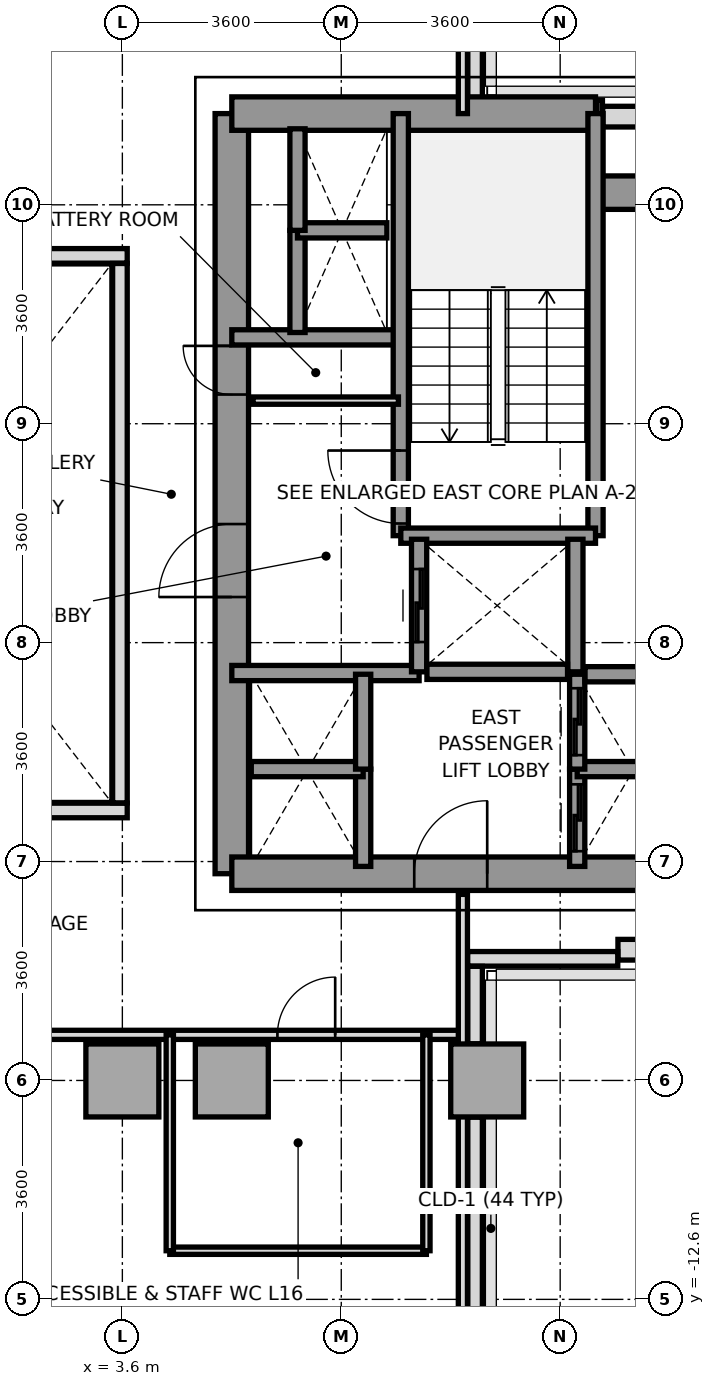
"""IFC4 building model, lengths in metres.
Left out: names, types, materials, properties, quantities, classifications, styles, units other than length and angle.
Written with IfcOpenShell. Run it as: python <this file> out.ifc"""

import sys

from ifc_helpers import new_model, si_unit, direction, frame, frame_2d, origin, origin_2d, place, context, subcontext, project, spatial, rectangle, extrude, source, transform, mapped, element, fill, save


model = new_model("IFC4")
c1 = context("Model", 3, precision=1e-05, world=origin(), true_north=direction((0.0, 1.0)))
c2 = subcontext(c1, "Body", "Model", "MODEL_VIEW")
j1 = project(units=[si_unit("LENGTHUNIT", "METRE"), si_unit("PLANEANGLEUNIT", "RADIAN")], contexts=[c1])
p1 = place(None, origin())
s1 = spatial("IfcSite", under=j1, at=p1, CompositionType="ELEMENT")
p2 = place(p1, origin())
s2 = spatial("IfcBuilding", under=s1, at=p2, CompositionType="ELEMENT")
p3 = place(p2, frame((0.0, 0.0, 64.6)))
s3 = spatial("IfcBuildingStorey", under=s2, at=p3, CompositionType="ELEMENT", Elevation=64.6)
m1 = source(origin(), c2, "Body", "SweptSolid", [
    extrude(rectangle(XDim=1.2, YDim=1.2, at=origin_2d()), origin(), (0.0, 0.0, 1.0), 3.2),
])
for number, where, z_axis, x_axis in (
    (1, (3.6, -9.0, 0.0), (0.0, 0.0, 1.0), (1.0, 0.0, 0.0)),
    (2, (5.4, -9.0, 0.0), (0.0, 0.0, 1.0), (1.0, 0.0, 0.0)),
    (3, (9.6, -9.0, 0.0), (0.0, 0.0, 1.0), (1.0, 0.0, 0.0)),
):
    element("IfcColumn", number, at=place(p3, frame(where, z_axis=z_axis, x_axis=x_axis)), inside=s3, PredefinedType="COLUMN", context=c2, shape_type="MappedRepresentation", body=[
        mapped(m1, transform((0.0, 0.0, 0.0), x_axis=(1.0, 0.0, 0.0), y_axis=(0.0, 1.0, 0.0), z_axis=(0.0, 0.0, 1.0), scale=1.0)),
    ])
p4 = place(p3, frame((11.498, 6.85, 0.0), z_axis=(0.0, 0.0, 1.0), x_axis=(1.0, 0.0, 0.0)))
e4 = element("IfcWall", 4, at=p4, inside=s3, PredefinedType="SOLIDWALL", context=c2, shape_type="SweptSolid", body=[
    extrude(rectangle(XDim=2.535, YDim=0.34, at=frame_2d((1.268, 0.0))), origin(), (0.0, 0.0, 1.0), 3.2),
])
p5 = place(p3, frame((11.75, -6.85, 0.0), z_axis=(0.0, 0.0, 1.0), x_axis=(1.0, 0.0, 0.0)))
e5 = element("IfcWall", 5, at=p5, inside=s3, PredefinedType="SOLIDWALL", context=c2, shape_type="SweptSolid", body=[
    extrude(rectangle(XDim=2.283, YDim=0.34, at=frame_2d((1.142, 0.0))), origin(), (0.0, 0.0, 1.0), 3.2),
])
p6 = place(p3, frame((11.747, -7.0, 0.0), z_axis=(0.0, 0.0, 1.0), x_axis=(-1.0, 0.0, 0.0)))
e6 = element("IfcWall", 6, at=p6, inside=s3, PredefinedType="PARAPET", context=c2, shape_type="SweptSolid", body=[
    extrude(rectangle(XDim=2.469, YDim=0.24, at=frame_2d((1.234, 0.0))), origin(), (0.0, 0.0, 1.0), 1.15),
])
p7 = place(p3, frame((9.4, -7.123, 0.0), z_axis=(0.0, 0.0, 1.0), x_axis=(0.0, -1.0, 0.0)))
e7 = element("IfcWall", 7, at=p7, inside=s3, PredefinedType="PARAPET", context=c2, shape_type="SweptSolid", body=[
    extrude(rectangle(XDim=1.274, YDim=0.24, at=frame_2d((0.637, 0.0))), origin(), (0.0, 0.0, 1.0), 1.15),
])
p8 = place(p3, frame((9.4, -9.603, 0.0), z_axis=(0.0, 0.0, 1.0), x_axis=(0.0, -1.0, 0.0)))
e8 = element("IfcWall", 8, at=p8, inside=s3, PredefinedType="PARAPET", context=c2, shape_type="SweptSolid", body=[
    extrude(rectangle(XDim=6.0, YDim=0.24, at=frame_2d((3.0, 0.0))), origin(), (0.0, 0.0, 1.0), 1.15),
])
p9 = place(p3, frame((9.4, 8.397, 0.0), z_axis=(0.0, 0.0, 1.0), x_axis=(0.0, -1.0, 0.0)))
e9 = element("IfcWall", 9, at=p9, inside=s3, PredefinedType="PARAPET", context=c2, shape_type="SweptSolid", body=[
    extrude(rectangle(XDim=1.444, YDim=0.24, at=frame_2d((0.722, 0.0))), origin(), (0.0, 0.0, 1.0), 1.15),
])
p10 = place(p3, frame((11.403, 7.0, 0.0), z_axis=(0.0, 0.0, 1.0), x_axis=(1.0, 0.0, 0.0)))
e10 = element("IfcWall", 10, at=p10, inside=s3, PredefinedType="PARAPET", context=c2, shape_type="SweptSolid", body=[
    extrude(rectangle(XDim=0.092, YDim=0.24, at=frame_2d((0.046, 0.0))), origin(), (0.0, 0.0, 1.0), 1.15),
])
p11 = place(p3, frame((5.4, -5.6, 0.0), z_axis=(0.0, 0.0, 1.0), x_axis=(0.0, 1.0, 0.0)))
e11 = element("IfcWall", 11, at=p11, inside=s3, PredefinedType="SHEAR", context=c2, shape_type="SweptSolid", body=[
    extrude(rectangle(XDim=12.5, YDim=0.55, at=frame_2d((6.25, 0.0))), origin(), (0.0, 0.0, 1.0), 3.2),
])
p12 = place(p11, frame((4.55, 0.0, 0.0)))
e12 = element("IfcOpeningElement", 12, at=p12, cuts=e11, PredefinedType="OPENING", context=c2, shape_type="SweptSolid", body=[
    extrude(rectangle(XDim=1.2, YDim=2.2, at=frame_2d((0.6, 1.1))), frame((0.0, 0.285, 0.0), z_axis=(0.0, -1.0, 0.0), x_axis=(1.0, 0.0, 0.0)), (0.0, 0.0, 1.0), 0.57),
])
p13 = place(p11, frame((7.88, 0.0, 0.0)))
e13 = element("IfcOpeningElement", 13, at=p13, cuts=e11, PredefinedType="OPENING", context=c2, shape_type="SweptSolid", body=[
    extrude(rectangle(XDim=0.8, YDim=2.1, at=frame_2d((0.4, 1.05))), frame((0.0, 0.285, 0.0), z_axis=(0.0, -1.0, 0.0), x_axis=(1.0, 0.0, 0.0)), (0.0, 0.0, 1.0), 0.57),
])
p14 = place(p3, frame((5.4, 6.9, 0.0), z_axis=(0.0, 0.0, 1.0), x_axis=(1.0, 0.0, 0.0)))
e14 = element("IfcWall", 14, at=p14, inside=s3, PredefinedType="SHEAR", context=c2, shape_type="SweptSolid", body=[
    extrude(rectangle(XDim=5.981, YDim=0.55, at=frame_2d((2.991, 0.0))), origin(), (0.0, 0.0, 1.0), 3.2),
])
p15 = place(p3, frame((11.381, 5.6, 0.0), z_axis=(0.0, 0.0, 1.0), x_axis=(1.0, 0.0, 0.0)))
e15 = element("IfcWall", 15, at=p15, inside=s3, PredefinedType="SHEAR", context=c2, shape_type="SweptSolid", body=[
    extrude(rectangle(XDim=1.819, YDim=0.55, at=frame_2d((0.909, 0.0))), origin(), (0.0, 0.0, 1.0), 3.2),
])
p16 = place(p3, frame((5.4, -5.6, 0.0), z_axis=(0.0, 0.0, 1.0), x_axis=(1.0, 0.0, 0.0)))
e16 = element("IfcWall", 16, at=p16, inside=s3, PredefinedType="SHEAR", context=c2, shape_type="SweptSolid", body=[
    extrude(rectangle(XDim=7.8, YDim=0.55, at=frame_2d((3.9, 0.0))), origin(), (0.0, 0.0, 1.0), 3.2),
])
p17 = place(p16, frame((3.0, 0.0, 0.0)))
e17 = element("IfcOpeningElement", 17, at=p17, cuts=e16, PredefinedType="OPENING", context=c2, shape_type="SweptSolid", body=[
    extrude(rectangle(XDim=1.2, YDim=2.2, at=frame_2d((0.6, 1.1))), frame((0.0, 0.285, 0.0), z_axis=(0.0, -1.0, 0.0), x_axis=(1.0, 0.0, 0.0)), (0.0, 0.0, 1.0), 0.57),
])
p18 = place(p3, frame((5.4, 3.22, 0.0), z_axis=(0.0, 0.0, 1.0), x_axis=(1.0, 0.0, 0.0)))
e18 = element("IfcWall", 18, at=p18, inside=s3, PredefinedType="SOLIDWALL", context=c2, shape_type="SweptSolid", body=[
    extrude(rectangle(XDim=2.78, YDim=0.25, at=frame_2d((1.39, 0.0))), origin(), (0.0, 0.0, 1.0), 3.2),
])
p19 = place(p3, frame((5.4, -2.3, 0.0), z_axis=(0.0, 0.0, 1.0), x_axis=(1.0, 0.0, 0.0)))
e19 = element("IfcWall", 19, at=p19, inside=s3, PredefinedType="SOLIDWALL", context=c2, shape_type="SweptSolid", body=[
    extrude(rectangle(XDim=3.08, YDim=0.25, at=frame_2d((1.54, 0.0))), origin(), (0.0, 0.0, 1.0), 3.2),
])
p20 = place(p3, frame((8.179, -0.041, 0.0), z_axis=(0.0, 0.0, 1.0), x_axis=(0.0, 1.0, 0.0)))
e20 = element("IfcWall", 20, at=p20, inside=s3, PredefinedType="SOLIDWALL", context=c2, shape_type="SweptSolid", body=[
    extrude(rectangle(XDim=6.941, YDim=0.25, at=frame_2d((3.47, 0.0))), origin(), (0.0, 0.0, 1.0), 3.2),
])
p21 = place(p20, frame((0.2, 0.0, 0.0)))
e21 = element("IfcOpeningElement", 21, at=p21, cuts=e20, PredefinedType="OPENING", context=c2, shape_type="SweptSolid", body=[
    extrude(rectangle(XDim=1.2, YDim=2.2, at=frame_2d((0.6, 1.1))), frame((0.0, 0.135, 0.0), z_axis=(0.0, -1.0, 0.0), x_axis=(1.0, 0.0, 0.0)), (0.0, 0.0, 1.0), 0.27),
])
p22 = place(p3, frame((11.381, -0.041, 0.0), z_axis=(0.0, 0.0, 1.0), x_axis=(0.0, 1.0, 0.0)))
e22 = element("IfcWall", 22, at=p22, inside=s3, PredefinedType="SOLIDWALL", context=c2, shape_type="SweptSolid", body=[
    extrude(rectangle(XDim=6.941, YDim=0.25, at=frame_2d((3.47, 0.0))), origin(), (0.0, 0.0, 1.0), 3.2),
])
p23 = place(p3, frame((8.179, -0.041, 0.0), z_axis=(0.0, 0.0, 1.0), x_axis=(1.0, 0.0, 0.0)))
e23 = element("IfcWall", 23, at=p23, inside=s3, PredefinedType="SOLIDWALL", context=c2, shape_type="SweptSolid", body=[
    extrude(rectangle(XDim=3.202, YDim=0.25, at=frame_2d((1.601, 0.0))), origin(), (0.0, 0.0, 1.0), 3.2),
])
p24 = place(p3, frame((8.48, -2.28, 0.0), z_axis=(0.0, 0.0, 1.0), x_axis=(0.0, 1.0, 0.0)))
e24 = element("IfcWall", 24, at=p24, inside=s3, PredefinedType="SOLIDWALL", context=c2, shape_type="SweptSolid", body=[
    extrude(rectangle(XDim=2.18, YDim=0.25, at=frame_2d((1.09, 0.0))), origin(), (0.0, 0.0, 1.0), 3.2),
])
p25 = place(p24, frame((0.49, 0.0, 0.0)))
e25 = element("IfcOpeningElement", 25, at=p25, cuts=e24, PredefinedType="OPENING", context=c2, shape_type="SweptSolid", body=[
    extrude(rectangle(XDim=1.2, YDim=2.2, at=frame_2d((0.6, 1.1))), frame((0.0, 0.135, 0.0), z_axis=(0.0, -1.0, 0.0), x_axis=(1.0, 0.0, 0.0)), (0.0, 0.0, 1.0), 0.27),
])
p26 = place(p3, frame((11.05, -2.28, 0.0), z_axis=(0.0, 0.0, 1.0), x_axis=(0.0, 1.0, 0.0)))
e26 = element("IfcWall", 26, at=p26, inside=s3, PredefinedType="SOLIDWALL", context=c2, shape_type="SweptSolid", body=[
    extrude(rectangle(XDim=2.18, YDim=0.25, at=frame_2d((1.09, 0.0))), origin(), (0.0, 0.0, 1.0), 3.2),
])
p27 = place(p3, frame((8.609, -2.28, 0.0), z_axis=(0.0, 0.0, 1.0), x_axis=(1.0, 0.0, 0.0)))
e27 = element("IfcWall", 27, at=p27, inside=s3, PredefinedType="SOLIDWALL", context=c2, shape_type="SweptSolid", body=[
    extrude(rectangle(XDim=2.312, YDim=0.25, at=frame_2d((1.156, 0.0))), origin(), (0.0, 0.0, 1.0), 3.2),
])
p28 = place(p3, frame((11.08, -5.48, 0.0), z_axis=(0.0, 0.0, 1.0), x_axis=(0.0, 1.0, 0.0)))
e28 = element("IfcWall", 28, at=p28, inside=s3, PredefinedType="SOLIDWALL", context=c2, shape_type="SweptSolid", body=[
    extrude(rectangle(XDim=1.6, YDim=0.25, at=frame_2d((0.8, 0.0))), origin(), (0.0, 0.0, 1.0), 3.2),
])
p29 = place(p28, frame((0.25, 0.0, 0.0)))
e29 = element("IfcOpeningElement", 29, at=p29, cuts=e28, PredefinedType="OPENING", context=c2, shape_type="SweptSolid", body=[
    extrude(rectangle(XDim=1.1, YDim=2.2, at=frame_2d((0.55, 1.1))), frame((0.0, 0.135, 0.0), z_axis=(0.0, -1.0, 0.0), x_axis=(1.0, 0.0, 0.0)), (0.0, 0.0, 1.0), 0.27),
])
p30 = place(p3, frame((11.08, -3.88, 0.0), z_axis=(0.0, 0.0, 1.0), x_axis=(1.0, 0.0, 0.0)))
e30 = element("IfcWall", 30, at=p30, inside=s3, PredefinedType="SOLIDWALL", context=c2, shape_type="SweptSolid", body=[
    extrude(rectangle(XDim=1.84, YDim=0.25, at=frame_2d((0.92, 0.0))), origin(), (0.0, 0.0, 1.0), 3.2),
])
p31 = place(p3, frame((11.08, -3.88, 0.0), z_axis=(0.0, 0.0, 1.0), x_axis=(0.0, 1.0, 0.0)))
e31 = element("IfcWall", 31, at=p31, inside=s3, PredefinedType="SOLIDWALL", context=c2, shape_type="SweptSolid", body=[
    extrude(rectangle(XDim=1.56, YDim=0.25, at=frame_2d((0.78, 0.0))), origin(), (0.0, 0.0, 1.0), 3.2),
])
p32 = place(p31, frame((0.23, 0.0, 0.0)))
e32 = element("IfcOpeningElement", 32, at=p32, cuts=e31, PredefinedType="OPENING", context=c2, shape_type="SweptSolid", body=[
    extrude(rectangle(XDim=1.1, YDim=2.2, at=frame_2d((0.55, 1.1))), frame((0.0, 0.135, 0.0), z_axis=(0.0, -1.0, 0.0), x_axis=(1.0, 0.0, 0.0)), (0.0, 0.0, 1.0), 0.27),
])
p33 = place(p3, frame((11.209, -2.32, 0.0), z_axis=(0.0, 0.0, 1.0), x_axis=(1.0, 0.0, 0.0)))
e33 = element("IfcWall", 33, at=p33, inside=s3, PredefinedType="SOLIDWALL", context=c2, shape_type="SweptSolid", body=[
    extrude(rectangle(XDim=1.582, YDim=0.25, at=frame_2d((0.791, 0.0))), origin(), (0.0, 0.0, 1.0), 3.2),
])
p34 = place(p3, frame((7.56, -5.48, 0.0), z_axis=(0.0, 0.0, 1.0), x_axis=(0.0, 1.0, 0.0)))
e34 = element("IfcWall", 34, at=p34, inside=s3, PredefinedType="SOLIDWALL", context=c2, shape_type="SweptSolid", body=[
    extrude(rectangle(XDim=1.6, YDim=0.25, at=frame_2d((0.8, 0.0))), origin(), (0.0, 0.0, 1.0), 3.2),
])
p35 = place(p3, frame((5.72, -3.88, 0.0), z_axis=(0.0, 0.0, 1.0), x_axis=(1.0, 0.0, 0.0)))
e35 = element("IfcWall", 35, at=p35, inside=s3, PredefinedType="SOLIDWALL", context=c2, shape_type="SweptSolid", body=[
    extrude(rectangle(XDim=1.84, YDim=0.25, at=frame_2d((0.92, 0.0))), origin(), (0.0, 0.0, 1.0), 3.2),
])
p36 = place(p3, frame((7.56, -3.88, 0.0), z_axis=(0.0, 0.0, 1.0), x_axis=(0.0, 1.0, 0.0)))
e36 = element("IfcWall", 36, at=p36, inside=s3, PredefinedType="SOLIDWALL", context=c2, shape_type="SweptSolid", body=[
    extrude(rectangle(XDim=1.56, YDim=0.25, at=frame_2d((0.78, 0.0))), origin(), (0.0, 0.0, 1.0), 3.2),
])
p37 = place(p3, frame((6.48, 3.3, 0.0), z_axis=(0.0, 0.0, 1.0), x_axis=(0.0, 1.0, 0.0)))
e37 = element("IfcWall", 37, at=p37, inside=s3, PredefinedType="SOLIDWALL", context=c2, shape_type="SweptSolid", body=[
    extrude(rectangle(XDim=1.68, YDim=0.25, at=frame_2d((0.84, 0.0))), origin(), (0.0, 0.0, 1.0), 3.2),
])
p38 = place(p3, frame((6.48, 4.98, 0.0), z_axis=(0.0, 0.0, 1.0), x_axis=(1.0, 0.0, 0.0)))
e38 = element("IfcWall", 38, at=p38, inside=s3, PredefinedType="SOLIDWALL", context=c2, shape_type="SweptSolid", body=[
    extrude(rectangle(XDim=1.47, YDim=0.25, at=frame_2d((0.735, 0.0))), origin(), (0.0, 0.0, 1.0), 3.2),
])
p39 = place(p3, frame((6.48, 4.98, 0.0), z_axis=(0.0, 0.0, 1.0), x_axis=(0.0, 1.0, 0.0)))
e39 = element("IfcWall", 39, at=p39, inside=s3, PredefinedType="SOLIDWALL", context=c2, shape_type="SweptSolid", body=[
    extrude(rectangle(XDim=1.67, YDim=0.25, at=frame_2d((0.835, 0.0))), origin(), (0.0, 0.0, 1.0), 3.2),
])
p40 = place(p3, frame((5.75, 2.18, 0.0), z_axis=(0.0, 0.0, 1.0), x_axis=(1.0, 0.0, 0.0)))
e40 = element("IfcWall", 40, at=p40, inside=s3, PredefinedType="PARTITIONING", context=c2, shape_type="SweptSolid", body=[
    extrude(rectangle(XDim=2.39, YDim=0.12, at=frame_2d((1.195, 0.0))), origin(), (0.0, 0.0, 1.0), 2.3),
])
p41 = place(p3, frame((9.2, 6.9, 0.0), z_axis=(0.0, 0.0, 1.0), x_axis=(0.0, 1.0, 0.0)))
e41 = element("IfcWall", 41, at=p41, inside=s3, PredefinedType="PARTITIONING", context=c2, shape_type="SweptSolid", body=[
    extrude(rectangle(XDim=8.78, YDim=0.15, at=frame_2d((4.39, 0.0))), origin(), (0.0, 0.0, 1.0), 2.65),
])
p42 = place(p3, frame((-9.2, -8.25, 0.0), z_axis=(0.0, 0.0, 1.0), x_axis=(1.0, 0.0, 0.0)))
e42 = element("IfcWall", 42, at=p42, inside=s3, PredefinedType="PARTITIONING", context=c2, shape_type="SweptSolid", body=[
    extrude(rectangle(XDim=18.4, YDim=0.15, at=frame_2d((9.2, 0.0))), origin(), (0.0, 0.0, 1.0), 2.7),
])
p43 = place(p42, frame((15.35, 0.0, 0.0)))
e43 = element("IfcOpeningElement", 43, at=p43, cuts=e42, PredefinedType="OPENING", context=c2, shape_type="SweptSolid", body=[
    extrude(rectangle(XDim=0.95, YDim=2.15, at=frame_2d((0.475, 1.075))), frame((0.0, 0.085, 0.0), z_axis=(0.0, -1.0, 0.0), x_axis=(1.0, 0.0, 0.0)), (0.0, 0.0, 1.0), 0.17),
])
p44 = place(p42, frame((6.7, 0.0, 0.0)))
e44 = element("IfcOpeningElement", 44, at=p44, cuts=e42, PredefinedType="OPENING", context=c2, shape_type="SweptSolid", body=[
    extrude(rectangle(XDim=1.1, YDim=2.2, at=frame_2d((0.55, 1.1))), frame((0.0, 0.085, 0.0), z_axis=(0.0, -1.0, 0.0), x_axis=(1.0, 0.0, 0.0)), (0.0, 0.0, 1.0), 0.17),
])
p45 = place(p3, frame((9.2, -15.68, 0.0), z_axis=(0.0, 0.0, 1.0), x_axis=(0.0, 1.0, 0.0)))
e45 = element("IfcWall", 45, at=p45, inside=s3, PredefinedType="PARTITIONING", context=c2, shape_type="SweptSolid", body=[
    extrude(rectangle(XDim=9.74, YDim=0.15, at=frame_2d((4.87, 0.0))), origin(), (0.0, 0.0, 1.0), 2.65),
])
p46 = place(p3, frame((4.38, -11.8, 0.0), z_axis=(0.0, 0.0, 1.0), x_axis=(1.0, 0.0, 0.0)))
e46 = element("IfcWall", 46, at=p46, inside=s3, PredefinedType="PARTITIONING", context=c2, shape_type="SweptSolid", body=[
    extrude(rectangle(XDim=4.22, YDim=0.12, at=frame_2d((2.11, 0.0))), origin(), (0.0, 0.0, 1.0), 3.2),
])
p47 = place(p3, frame((4.38, -11.8, 0.0), z_axis=(0.0, 0.0, 1.0), x_axis=(0.0, 1.0, 0.0)))
e47 = element("IfcWall", 47, at=p47, inside=s3, PredefinedType="PARTITIONING", context=c2, shape_type="SweptSolid", body=[
    extrude(rectangle(XDim=3.55, YDim=0.12, at=frame_2d((1.775, 0.0))), origin(), (0.0, 0.0, 1.0), 3.2),
])
p48 = place(p3, frame((8.6, -11.8, 0.0), z_axis=(0.0, 0.0, 1.0), x_axis=(0.0, 1.0, 0.0)))
e48 = element("IfcWall", 48, at=p48, inside=s3, PredefinedType="PARTITIONING", context=c2, shape_type="SweptSolid", body=[
    extrude(rectangle(XDim=3.55, YDim=0.12, at=frame_2d((1.775, 0.0))), origin(), (0.0, 0.0, 1.0), 2.65),
])
for number, where, z_axis, x_axis in (
    (49, (-3.68, -4.56, 0.0), (0.0, 0.0, 1.0), (1.0, 0.0, 0.0)),
    (50, (-3.68, 4.56, 0.0), (0.0, 0.0, 1.0), (1.0, 0.0, 0.0)),
):
    element("IfcWall", number, at=place(p3, frame(where, z_axis=z_axis, x_axis=x_axis)), inside=s3, PredefinedType="PARAPET", context=c2, shape_type="SweptSolid", body=[
        extrude(rectangle(XDim=7.36, YDim=0.24, at=frame_2d((3.68, 0.0))), origin(), (0.0, 0.0, 1.0), 1.15),
    ])
p49 = place(p3, frame((3.56, -4.435, 0.0), z_axis=(0.0, 0.0, 1.0), x_axis=(0.0, 1.0, 0.0)))
e51 = element("IfcWall", 51, at=p49, inside=s3, PredefinedType="PARAPET", context=c2, shape_type="SweptSolid", body=[
    extrude(rectangle(XDim=8.87, YDim=0.24, at=frame_2d((4.435, 0.0))), origin(), (0.0, 0.0, 1.0), 1.15),
])
m2 = source(origin(), c2, "Body", "SweptSolid", [
    extrude(rectangle(XDim=1.2, YDim=2.2, at=frame_2d((0.6, 1.1))), frame((0.0, 0.025, 0.0), z_axis=(0.0, -1.0, 0.0), x_axis=(1.0, 0.0, 0.0)), (0.0, 0.0, 1.0), 0.05),
])
p50 = place(p21, origin())
e52 = element("IfcDoor", 52, at=p50, inside=s3, OperationType="SINGLE_SWING_RIGHT", PredefinedType="DOOR", context=c2, shape_type="MappedRepresentation", body=[
    mapped(m2, transform((0.0, 0.0, 0.0), x_axis=(1.0, 0.0, 0.0), y_axis=(0.0, 1.0, 0.0), z_axis=(0.0, 0.0, 1.0), scale=1.0)),
])
fill(e21, e52)
p51 = place(p12, origin())
e53 = element("IfcDoor", 53, at=p51, inside=s3, OperationType="SINGLE_SWING_LEFT", PredefinedType="DOOR", context=c2, shape_type="MappedRepresentation", body=[
    mapped(m2, transform((0.0, 0.0, 0.0), x_axis=(1.0, 0.0, 0.0), y_axis=(0.0, 1.0, 0.0), z_axis=(0.0, 0.0, 1.0), scale=1.0)),
])
fill(e12, e53)
p52 = place(p17, origin())
e54 = element("IfcDoor", 54, at=p52, inside=s3, OperationType="SINGLE_SWING_RIGHT", PredefinedType="DOOR", context=c2, shape_type="MappedRepresentation", body=[
    mapped(m2, transform((0.0, 0.0, 0.0), x_axis=(1.0, 0.0, 0.0), y_axis=(0.0, 1.0, 0.0), z_axis=(0.0, 0.0, 1.0), scale=1.0)),
])
fill(e17, e54)
m3 = source(origin(), c2, "Body", "SweptSolid", [
    extrude(rectangle(XDim=0.8, YDim=2.1, at=frame_2d((0.4, 1.05))), frame((0.0, 0.025, 0.0), z_axis=(0.0, -1.0, 0.0), x_axis=(1.0, 0.0, 0.0)), (0.0, 0.0, 1.0), 0.05),
])
p53 = place(p13, origin())
e55 = element("IfcDoor", 55, at=p53, inside=s3, OperationType="SINGLE_SWING_RIGHT", PredefinedType="DOOR", context=c2, shape_type="MappedRepresentation", body=[
    mapped(m3, transform((0.0, 0.0, 0.0), x_axis=(1.0, 0.0, 0.0), y_axis=(0.0, 1.0, 0.0), z_axis=(0.0, 0.0, 1.0), scale=1.0)),
])
fill(e13, e55)
p54 = place(p25, origin())
e56 = element("IfcDoor", 56, at=p54, inside=s3, OperationType="SLIDING_TO_RIGHT", PredefinedType="DOOR", context=c2, shape_type="MappedRepresentation", body=[
    mapped(m2, transform((0.0, 0.0, 0.0), x_axis=(1.0, 0.0, 0.0), y_axis=(0.0, 1.0, 0.0), z_axis=(0.0, 0.0, 1.0), scale=1.0)),
])
fill(e25, e56)
m4 = source(origin(), c2, "Body", "SweptSolid", [
    extrude(rectangle(XDim=1.1, YDim=2.2, at=frame_2d((0.55, 1.1))), frame((0.0, 0.025, 0.0), z_axis=(0.0, -1.0, 0.0), x_axis=(1.0, 0.0, 0.0)), (0.0, 0.0, 1.0), 0.05),
])
p55 = place(p29, origin())
e57 = element("IfcDoor", 57, at=p55, inside=s3, OperationType="SLIDING_TO_LEFT", PredefinedType="DOOR", context=c2, shape_type="MappedRepresentation", body=[
    mapped(m4, transform((0.0, 0.0, 0.0), x_axis=(1.0, 0.0, 0.0), y_axis=(0.0, 1.0, 0.0), z_axis=(0.0, 0.0, 1.0), scale=1.0)),
])
fill(e29, e57)
p56 = place(p32, origin())
e58 = element("IfcDoor", 58, at=p56, inside=s3, OperationType="SLIDING_TO_LEFT", PredefinedType="DOOR", context=c2, shape_type="MappedRepresentation", body=[
    mapped(m4, transform((0.0, 0.0, 0.0), x_axis=(1.0, 0.0, 0.0), y_axis=(0.0, 1.0, 0.0), z_axis=(0.0, 0.0, 1.0), scale=1.0)),
])
fill(e32, e58)
m5 = source(origin(), c2, "Body", "SweptSolid", [
    extrude(rectangle(XDim=0.95, YDim=2.15, at=frame_2d((0.475, 1.075))), frame((0.0, 0.025, 0.0), z_axis=(0.0, -1.0, 0.0), x_axis=(1.0, 0.0, 0.0)), (0.0, 0.0, 1.0), 0.05),
])
p57 = place(p43, origin())
e59 = element("IfcDoor", 59, at=p57, inside=s3, OperationType="SINGLE_SWING_RIGHT", PredefinedType="DOOR", context=c2, shape_type="MappedRepresentation", body=[
    mapped(m5, transform((0.0, 0.0, 0.0), x_axis=(1.0, 0.0, 0.0), y_axis=(0.0, 1.0, 0.0), z_axis=(0.0, 0.0, 1.0), scale=1.0)),
])
fill(e43, e59)
save(model, sys.argv[1])
